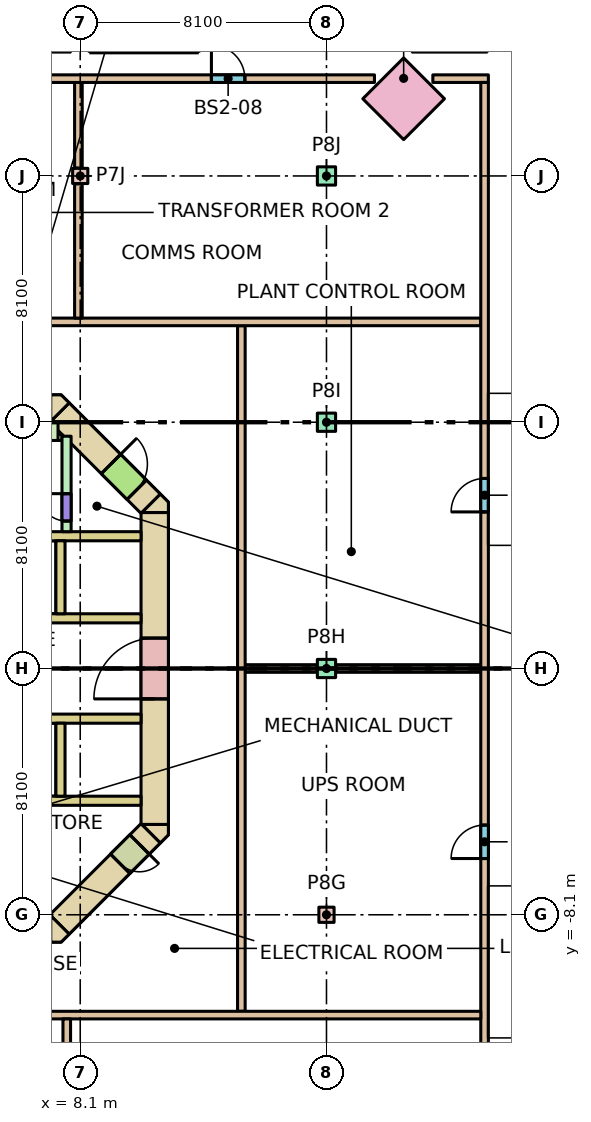
"""IFC4 building model, lengths in metres.
Left out: names, types, materials, properties, quantities, classifications, styles, units other than length and angle.
Written with IfcOpenShell. Run it as: python <this file> out.ifc"""

import sys

from ifc_helpers import new_model, si_unit, direction, frame, frame_2d, origin, origin_2d, place, context, subcontext, project, spatial, polyline, rectangle, outline, extrude, element, fill, save


model = new_model("IFC4")
c1 = context("Model", 3, precision=1e-05, world=origin(), true_north=direction((0.0, 1.0)))
c2 = subcontext(c1, "Body", "Model", "MODEL_VIEW")
j1 = project(units=[si_unit("LENGTHUNIT", "METRE"), si_unit("PLANEANGLEUNIT", "RADIAN")], contexts=[c1])
p1 = place(None, origin())
s1 = spatial("IfcSite", under=j1, at=p1, CompositionType="ELEMENT")
p2 = place(p1, origin())
s2 = spatial("IfcBuilding", under=s1, at=p2, CompositionType="ELEMENT")
p3 = place(p2, frame((0.0, 0.0, -7.2)))
s3 = spatial("IfcBuildingStorey", under=s2, at=p3, CompositionType="ELEMENT", Elevation=-7.2)
for number, where, z_axis, x_axis in (
    (1, (8.1, 16.2, 0.0), (0.0, 0.0, 1.0), (1.0, 0.0, 0.0)),
    (2, (16.2, -8.1, 0.0), (0.0, 0.0, 1.0), (1.0, 0.0, 0.0)),
):
    element("IfcColumn", number, at=place(p3, frame(where, z_axis=z_axis, x_axis=x_axis)), inside=s3, PredefinedType="COLUMN", context=c2, shape_type="SweptSolid", body=[
        extrude(rectangle(XDim=0.5, YDim=0.5, at=origin_2d()), origin(), (0.0, 0.0, 1.0), 3.6),
    ])
for number, where, z_axis, x_axis in (
    (3, (16.2, 0.0, 0.0), (0.0, 0.0, 1.0), (1.0, 0.0, 0.0)),
    (4, (16.2, 8.1, 0.0), (0.0, 0.0, 1.0), (1.0, 0.0, 0.0)),
    (5, (16.2, 16.2, 0.0), (0.0, 0.0, 1.0), (1.0, 0.0, 0.0)),
):
    element("IfcColumn", number, at=place(p3, frame(where, z_axis=z_axis, x_axis=x_axis)), inside=s3, PredefinedType="COLUMN", context=c2, shape_type="SweptSolid", body=[
        extrude(rectangle(XDim=0.6, YDim=0.6, at=origin_2d()), origin(), (0.0, 0.0, 1.0), 3.6),
    ])
p4 = place(p3, frame((18.738, 18.738, 0.0), z_axis=(0.0, 0.0, 1.0), x_axis=(-0.707106781187, 0.707106781187, 0.0)))
e6 = element("IfcColumn", 6, at=p4, inside=s3, PredefinedType="COLUMN", context=c2, shape_type="SweptSolid", body=[
    extrude(rectangle(XDim=1.9, YDim=1.9, at=origin_2d()), origin(), (0.0, 0.0, 1.0), 3.6),
])
p5 = place(p3, frame((10.55, -5.13, -0.32), z_axis=(0.0, 0.0, 1.0), x_axis=(0.0, 1.0, 0.0)))
e7 = element("IfcWall", 7, at=p5, inside=s3, PredefinedType="SHEAR", context=c2, shape_type="SweptSolid", body=[
    extrude(rectangle(XDim=10.26, YDim=0.9, at=frame_2d((5.13, 0.0))), origin(), (0.0, 0.0, 1.0), 3.6),
])
p6 = place(p5, frame((4.13, 0.0, 0.32)))
e8 = element("IfcOpeningElement", 8, at=p6, cuts=e7, PredefinedType="OPENING", context=c2, shape_type="SweptSolid", body=[
    extrude(rectangle(XDim=2.0, YDim=2.1, at=frame_2d((1.0, 1.05))), frame((0.0, 0.46, 0.0), z_axis=(0.0, -1.0, 0.0), x_axis=(1.0, 0.0, 0.0)), (0.0, 0.0, 1.0), 0.92),
])
p7 = place(p3, frame((7.418, 8.418, -0.32), z_axis=(0.0, 0.0, 1.0), x_axis=(0.707106781187, -0.707106781187, 0.0)))
e9 = element("IfcWall", 9, at=p7, inside=s3, PredefinedType="SHEAR", context=c2, shape_type="SweptSolid", body=[
    extrude(rectangle(XDim=4.243, YDim=0.9, at=frame_2d((2.121, 0.0))), origin(), (0.0, 0.0, 1.0), 3.6),
])
p8 = place(p7, frame((2.393, 0.0, 0.32)))
e10 = element("IfcOpeningElement", 10, at=p8, cuts=e9, PredefinedType="OPENING", context=c2, shape_type="SweptSolid", body=[
    extrude(rectangle(XDim=1.2, YDim=2.1, at=frame_2d((0.6, 1.05))), frame((0.0, 0.46, 0.0), z_axis=(0.0, -1.0, 0.0), x_axis=(1.0, 0.0, 0.0)), (0.0, 0.0, 1.0), 0.92),
])
p9 = place(p3, frame((10.418, -5.418, -0.32), z_axis=(0.0, 0.0, 1.0), x_axis=(-0.707106781187, -0.707106781187, 0.0)))
e11 = element("IfcWall", 11, at=p9, inside=s3, PredefinedType="SHEAR", context=c2, shape_type="SweptSolid", body=[
    extrude(rectangle(XDim=4.243, YDim=0.9, at=frame_2d((2.121, 0.0))), origin(), (0.0, 0.0, 1.0), 3.6),
])
p10 = place(p9, frame((0.52, 0.0, 0.32)))
e12 = element("IfcOpeningElement", 12, at=p10, cuts=e11, PredefinedType="OPENING", context=c2, shape_type="SweptSolid", body=[
    extrude(rectangle(XDim=0.9, YDim=2.1, at=frame_2d((0.45, 1.05))), frame((0.0, 0.46, 0.0), z_axis=(0.0, -1.0, 0.0), x_axis=(1.0, 0.0, 0.0)), (0.0, 0.0, 1.0), 0.92),
])
p11 = place(p3, frame((0.0, 0.0, -0.32)))
e13 = element("IfcWall", 13, at=p11, inside=s3, PredefinedType="SHEAR", context=c2, shape_type="SweptSolid", body=[
    extrude(outline(polyline([(7.473, -9.0), (7.13, -9.0), (7.13, -8.13), (7.736, -8.736), (7.473, -9.0)])), origin(), (0.0, 0.0, 1.0), 3.6),
])
p12 = place(p3, frame((0.0, 0.0, -0.32)))
e14 = element("IfcWall", 14, at=p12, inside=s3, PredefinedType="SHEAR", context=c2, shape_type="SweptSolid", body=[
    extrude(outline(polyline([(11.0, -5.473), (10.736, -5.736), (10.13, -5.13), (11.0, -5.13), (11.0, -5.473)])), origin(), (0.0, 0.0, 1.0), 3.6),
])
p13 = place(p3, frame((0.0, 0.0, -0.32)))
e15 = element("IfcWall", 15, at=p13, inside=s3, PredefinedType="SHEAR", context=c2, shape_type="SweptSolid", body=[
    extrude(outline(polyline([(11.0, 5.473), (11.0, 5.13), (10.13, 5.13), (10.736, 5.736), (11.0, 5.473)])), origin(), (0.0, 0.0, 1.0), 3.6),
])
p14 = place(p3, frame((0.0, 0.0, -0.32)))
e16 = element("IfcWall", 16, at=p14, inside=s3, PredefinedType="SHEAR", context=c2, shape_type="SweptSolid", body=[
    extrude(outline(polyline([(7.473, 9.0), (7.736, 8.736), (7.13, 8.13), (7.13, 9.0), (7.473, 9.0)])), origin(), (0.0, 0.0, 1.0), 3.6),
])
for number, where, z_axis, x_axis in (
    (17, (2.0, 4.35, 0.0), (0.0, 0.0, 1.0), (1.0, 0.0, 0.0)),
    (18, (2.0, -4.35, 0.0), (0.0, 0.0, 1.0), (1.0, 0.0, 0.0)),
    (19, (2.0, 1.65, 0.0), (0.0, 0.0, 1.0), (1.0, 0.0, 0.0)),
    (20, (2.0, -1.65, 0.0), (0.0, 0.0, 1.0), (1.0, 0.0, 0.0)),
):
    element("IfcWall", number, at=place(p3, frame(where, z_axis=z_axis, x_axis=x_axis)), inside=s3, PredefinedType="SOLIDWALL", context=c2, shape_type="SweptSolid", body=[
        extrude(rectangle(XDim=8.1, YDim=0.3, at=frame_2d((4.05, 0.0))), origin(), (0.0, 0.0, 1.0), 3.28),
    ])
for number, where, z_axis, x_axis in (
    (21, (7.45, 1.8, 0.0), (0.0, 0.0, 1.0), (0.0, 1.0, 0.0)),
    (22, (7.45, -4.2, 0.0), (0.0, 0.0, 1.0), (0.0, 1.0, 0.0)),
):
    element("IfcWall", number, at=place(p3, frame(where, z_axis=z_axis, x_axis=x_axis)), inside=s3, PredefinedType="SOLIDWALL", context=c2, shape_type="SweptSolid", body=[
        extrude(rectangle(XDim=2.4, YDim=0.3, at=frame_2d((1.2, 0.0))), origin(), (0.0, 0.0, 1.0), 3.28),
    ])
p15 = place(p3, frame((7.65, 4.5, 0.0), z_axis=(0.0, 0.0, 1.0), x_axis=(0.0, 1.0, 0.0)))
e23 = element("IfcWall", 23, at=p15, inside=s3, PredefinedType="SHEAR", context=c2, shape_type="SweptSolid", body=[
    extrude(rectangle(XDim=3.14, YDim=0.3, at=frame_2d((1.57, 0.0))), origin(), (0.0, 0.0, 1.0), 3.28),
])
p16 = place(p15, frame((0.35, 0.0, 0.0)))
e24 = element("IfcOpeningElement", 24, at=p16, cuts=e23, PredefinedType="OPENING", context=c2, shape_type="SweptSolid", body=[
    extrude(rectangle(XDim=0.9, YDim=2.1, at=frame_2d((0.45, 1.05))), frame((0.0, 0.16, 0.0), z_axis=(0.0, -1.0, 0.0), x_axis=(1.0, 0.0, 0.0)), (0.0, 0.0, 1.0), 0.32),
])
p17 = place(p3, frame((2.0, 7.8, 0.0), z_axis=(0.0, 0.0, 1.0), x_axis=(1.0, 0.0, 0.0)))
e25 = element("IfcWall", 25, at=p17, inside=s3, PredefinedType="SHEAR", context=c2, shape_type="SweptSolid", body=[
    extrude(rectangle(XDim=5.37, YDim=0.6, at=frame_2d((2.685, 0.0))), origin(), (0.0, 0.0, 1.0), 3.28),
])
p18 = place(p3, frame((6.9, 7.6, 0.0), z_axis=(0.0, 0.0, 1.0), x_axis=(1.0, 0.0, 0.0)))
e26 = element("IfcWall", 26, at=p18, inside=s3, PredefinedType="SHEAR", context=c2, shape_type="SweptSolid", body=[
    extrude(rectangle(XDim=0.6, YDim=0.2, at=frame_2d((0.3, 0.0))), origin(), (0.0, 0.0, 1.0), 3.28),
])
p19 = place(p3, frame((13.525, 0.0, 0.0), z_axis=(0.0, 0.0, 1.0), x_axis=(1.0, 0.0, 0.0)))
e27 = element("IfcWall", 27, at=p19, inside=s3, PredefinedType="PARTITIONING", context=c2, shape_type="SweptSolid", body=[
    extrude(rectangle(XDim=2.365, YDim=0.25, at=frame_2d((1.183, 0.0))), origin(), (0.0, 0.0, 1.0), 3.28),
])
p20 = place(p3, frame((16.51, 0.0, 0.0), z_axis=(0.0, 0.0, 1.0), x_axis=(1.0, 0.0, 0.0)))
e28 = element("IfcWall", 28, at=p20, inside=s3, PredefinedType="PARTITIONING", context=c2, shape_type="SweptSolid", body=[
    extrude(rectangle(XDim=4.765, YDim=0.25, at=frame_2d((2.382, 0.0))), origin(), (0.0, 0.0, 1.0), 3.28),
])
p21 = place(p3, frame((13.4, -11.275, 0.0), z_axis=(0.0, 0.0, 1.0), x_axis=(0.0, 1.0, 0.0)))
e29 = element("IfcWall", 29, at=p21, inside=s3, PredefinedType="PARTITIONING", context=c2, shape_type="SweptSolid", body=[
    extrude(rectangle(XDim=22.55, YDim=0.25, at=frame_2d((11.275, 0.0))), origin(), (0.0, 0.0, 1.0), 3.28),
])
p22 = place(p3, frame((-13.275, 11.4, 0.0), z_axis=(0.0, 0.0, 1.0), x_axis=(1.0, 0.0, 0.0)))
e30 = element("IfcWall", 30, at=p22, inside=s3, PredefinedType="PARTITIONING", context=c2, shape_type="SweptSolid", body=[
    extrude(rectangle(XDim=34.55, YDim=0.25, at=frame_2d((17.275, 0.0))), origin(), (0.0, 0.0, 1.0), 3.28),
])
p23 = place(p3, frame((8.04, 11.525, 0.0), z_axis=(0.0, 0.0, 1.0), x_axis=(0.0, 1.0, 0.0)))
e31 = element("IfcWall", 31, at=p23, inside=s3, PredefinedType="PARTITIONING", context=c2, shape_type="SweptSolid", body=[
    extrude(rectangle(XDim=4.415, YDim=0.25, at=frame_2d((2.208, 0.0))), origin(), (0.0, 0.0, 1.0), 3.28),
])
p24 = place(p3, frame((8.04, 16.46, 0.0), z_axis=(0.0, 0.0, 1.0), x_axis=(0.0, 1.0, 0.0)))
e32 = element("IfcWall", 32, at=p24, inside=s3, PredefinedType="PARTITIONING", context=c2, shape_type="SweptSolid", body=[
    extrude(rectangle(XDim=2.815, YDim=0.25, at=frame_2d((1.407, 0.0))), origin(), (0.0, 0.0, 1.0), 3.28),
])
p25 = place(p3, frame((19.698, 19.4, 0.0), z_axis=(0.0, 0.0, 1.0), x_axis=(1.0, 0.0, 0.0)))
e33 = element("IfcWall", 33, at=p25, inside=s3, PredefinedType="PARTITIONING", context=c2, shape_type="SweptSolid", body=[
    extrude(rectangle(XDim=1.827, YDim=0.25, at=frame_2d((0.913, 0.0))), origin(), (0.0, 0.0, 1.0), 3.28),
])
p26 = place(p3, frame((21.4, -19.275, 0.0), z_axis=(0.0, 0.0, 1.0), x_axis=(0.0, 1.0, 0.0)))
e34 = element("IfcWall", 34, at=p26, inside=s3, PredefinedType="PARTITIONING", context=c2, shape_type="SweptSolid", body=[
    extrude(rectangle(XDim=38.55, YDim=0.25, at=frame_2d((19.275, 0.0))), origin(), (0.0, 0.0, 1.0), 3.28),
])
p27 = place(p26, frame((3.45, 0.0, 0.0)))
e35 = element("IfcOpeningElement", 35, at=p27, cuts=e34, PredefinedType="OPENING", context=c2, shape_type="SweptSolid", body=[
    extrude(rectangle(XDim=1.0, YDim=2.1, at=frame_2d((0.5, 1.05))), frame((0.0, 0.135, 0.0), z_axis=(0.0, -1.0, 0.0), x_axis=(1.0, 0.0, 0.0)), (0.0, 0.0, 1.0), 0.27),
])
p28 = place(p26, frame((13.025, 0.0, 0.0)))
e36 = element("IfcOpeningElement", 36, at=p28, cuts=e34, PredefinedType="OPENING", context=c2, shape_type="SweptSolid", body=[
    extrude(rectangle(XDim=1.1, YDim=2.1, at=frame_2d((0.55, 1.05))), frame((0.0, 0.135, 0.0), z_axis=(0.0, -1.0, 0.0), x_axis=(1.0, 0.0, 0.0)), (0.0, 0.0, 1.0), 0.27),
])
p29 = place(p26, frame((24.425, 0.0, 0.0)))
e37 = element("IfcOpeningElement", 37, at=p29, cuts=e34, PredefinedType="OPENING", context=c2, shape_type="SweptSolid", body=[
    extrude(rectangle(XDim=1.1, YDim=2.1, at=frame_2d((0.55, 1.05))), frame((0.0, 0.135, 0.0), z_axis=(0.0, -1.0, 0.0), x_axis=(1.0, 0.0, 0.0)), (0.0, 0.0, 1.0), 0.27),
])
p30 = place(p3, frame((-17.778, 19.4, 0.0), z_axis=(0.0, 0.0, 1.0), x_axis=(1.0, 0.0, 0.0)))
e38 = element("IfcWall", 38, at=p30, inside=s3, PredefinedType="PARTITIONING", context=c2, shape_type="SweptSolid", body=[
    extrude(rectangle(XDim=35.557, YDim=0.25, at=frame_2d((17.778, 0.0))), origin(), (0.0, 0.0, 1.0), 3.28),
])
p31 = place(p30, frame((7.553, 0.0, 0.0)))
e39 = element("IfcOpeningElement", 39, at=p31, cuts=e38, PredefinedType="OPENING", context=c2, shape_type="SweptSolid", body=[
    extrude(rectangle(XDim=1.1, YDim=2.1, at=frame_2d((0.55, 1.05))), frame((0.0, 0.135, 0.0), z_axis=(0.0, -1.0, 0.0), x_axis=(1.0, 0.0, 0.0)), (0.0, 0.0, 1.0), 0.27),
])
p32 = place(p30, frame((14.7, 0.0, 0.0)))
e40 = element("IfcOpeningElement", 40, at=p32, cuts=e38, PredefinedType="OPENING", context=c2, shape_type="SweptSolid", body=[
    extrude(rectangle(XDim=1.1, YDim=2.1, at=frame_2d((0.55, 1.05))), frame((0.0, 0.135, 0.0), z_axis=(0.0, -1.0, 0.0), x_axis=(1.0, 0.0, 0.0)), (0.0, 0.0, 1.0), 0.27),
])
p33 = place(p30, frame((21.847, 0.0, 0.0)))
e41 = element("IfcOpeningElement", 41, at=p33, cuts=e38, PredefinedType="OPENING", context=c2, shape_type="SweptSolid", body=[
    extrude(rectangle(XDim=1.1, YDim=2.1, at=frame_2d((0.55, 1.05))), frame((0.0, 0.135, 0.0), z_axis=(0.0, -1.0, 0.0), x_axis=(1.0, 0.0, 0.0)), (0.0, 0.0, 1.0), 0.27),
])
p34 = place(p30, frame((30.193, 0.0, 0.0)))
e42 = element("IfcOpeningElement", 42, at=p34, cuts=e38, PredefinedType="OPENING", context=c2, shape_type="SweptSolid", body=[
    extrude(rectangle(XDim=1.1, YDim=2.1, at=frame_2d((0.55, 1.05))), frame((0.0, 0.135, 0.0), z_axis=(0.0, -1.0, 0.0), x_axis=(1.0, 0.0, 0.0)), (0.0, 0.0, 1.0), 0.27),
])
p35 = place(p3, frame((-13.275, -11.4, 0.0), z_axis=(0.0, 0.0, 1.0), x_axis=(1.0, 0.0, 0.0)))
e43 = element("IfcWall", 43, at=p35, inside=s3, PredefinedType="PARTITIONING", context=c2, shape_type="SweptSolid", body=[
    extrude(rectangle(XDim=34.55, YDim=0.25, at=frame_2d((17.275, 0.0))), origin(), (0.0, 0.0, 1.0), 3.28),
])
p36 = place(p3, frame((7.657, -19.275, 0.0), z_axis=(0.0, 0.0, 1.0), x_axis=(0.0, 1.0, 0.0)))
e44 = element("IfcWall", 44, at=p36, inside=s3, PredefinedType="PARTITIONING", context=c2, shape_type="SweptSolid", body=[
    extrude(rectangle(XDim=7.75, YDim=0.25, at=frame_2d((3.875, 0.0))), origin(), (0.0, 0.0, 1.0), 3.28),
])
p37 = place(p16, origin())
e45 = element("IfcDoor", 45, at=p37, inside=s3, OperationType="SINGLE_SWING_RIGHT", PredefinedType="DOOR", context=c2, shape_type="SweptSolid", body=[
    extrude(rectangle(XDim=0.9, YDim=2.1, at=frame_2d((0.45, 1.05))), frame((0.0, 0.025, 0.0), z_axis=(0.0, -1.0, 0.0), x_axis=(1.0, 0.0, 0.0)), (0.0, 0.0, 1.0), 0.05),
])
fill(e24, e45)
p38 = place(p8, origin())
e46 = element("IfcDoor", 46, at=p38, inside=s3, OperationType="SINGLE_SWING_LEFT", PredefinedType="DOOR", context=c2, shape_type="SweptSolid", body=[
    extrude(rectangle(XDim=1.2, YDim=2.1, at=frame_2d((0.6, 1.05))), frame((0.0, 0.025, 0.0), z_axis=(0.0, -1.0, 0.0), x_axis=(1.0, 0.0, 0.0)), (0.0, 0.0, 1.0), 0.05),
])
fill(e10, e46)
p39 = place(p6, origin())
e47 = element("IfcDoor", 47, at=p39, inside=s3, OperationType="DOUBLE_DOOR_SINGLE_SWING", PredefinedType="DOOR", context=c2, shape_type="SweptSolid", body=[
    extrude(rectangle(XDim=2.0, YDim=2.1, at=frame_2d((1.0, 1.05))), frame((0.0, 0.025, 0.0), z_axis=(0.0, -1.0, 0.0), x_axis=(1.0, 0.0, 0.0)), (0.0, 0.0, 1.0), 0.05),
])
fill(e8, e47)
p40 = place(p10, origin())
e48 = element("IfcDoor", 48, at=p40, inside=s3, OperationType="SINGLE_SWING_LEFT", PredefinedType="DOOR", context=c2, shape_type="SweptSolid", body=[
    extrude(rectangle(XDim=0.9, YDim=2.1, at=frame_2d((0.45, 1.05))), frame((0.0, 0.025, 0.0), z_axis=(0.0, -1.0, 0.0), x_axis=(1.0, 0.0, 0.0)), (0.0, 0.0, 1.0), 0.05),
])
fill(e12, e48)
p41 = place(p34, origin())
e49 = element("IfcDoor", 49, at=p41, inside=s3, OperationType="SINGLE_SWING_LEFT", PredefinedType="DOOR", context=c2, shape_type="SweptSolid", body=[
    extrude(rectangle(XDim=1.1, YDim=2.1, at=frame_2d((0.55, 1.05))), frame((0.0, 0.025, 0.0), z_axis=(0.0, -1.0, 0.0), x_axis=(1.0, 0.0, 0.0)), (0.0, 0.0, 1.0), 0.05),
])
fill(e42, e49)
p42 = place(p28, origin())
e50 = element("IfcDoor", 50, at=p42, inside=s3, OperationType="SINGLE_SWING_LEFT", PredefinedType="DOOR", context=c2, shape_type="SweptSolid", body=[
    extrude(rectangle(XDim=1.1, YDim=2.1, at=frame_2d((0.55, 1.05))), frame((0.0, 0.025, 0.0), z_axis=(0.0, -1.0, 0.0), x_axis=(1.0, 0.0, 0.0)), (0.0, 0.0, 1.0), 0.05),
])
fill(e36, e50)
p43 = place(p29, origin())
e51 = element("IfcDoor", 51, at=p43, inside=s3, OperationType="SINGLE_SWING_LEFT", PredefinedType="DOOR", context=c2, shape_type="SweptSolid", body=[
    extrude(rectangle(XDim=1.1, YDim=2.1, at=frame_2d((0.55, 1.05))), frame((0.0, 0.025, 0.0), z_axis=(0.0, -1.0, 0.0), x_axis=(1.0, 0.0, 0.0)), (0.0, 0.0, 1.0), 0.05),
])
fill(e37, e51)
save(model, sys.argv[1])
